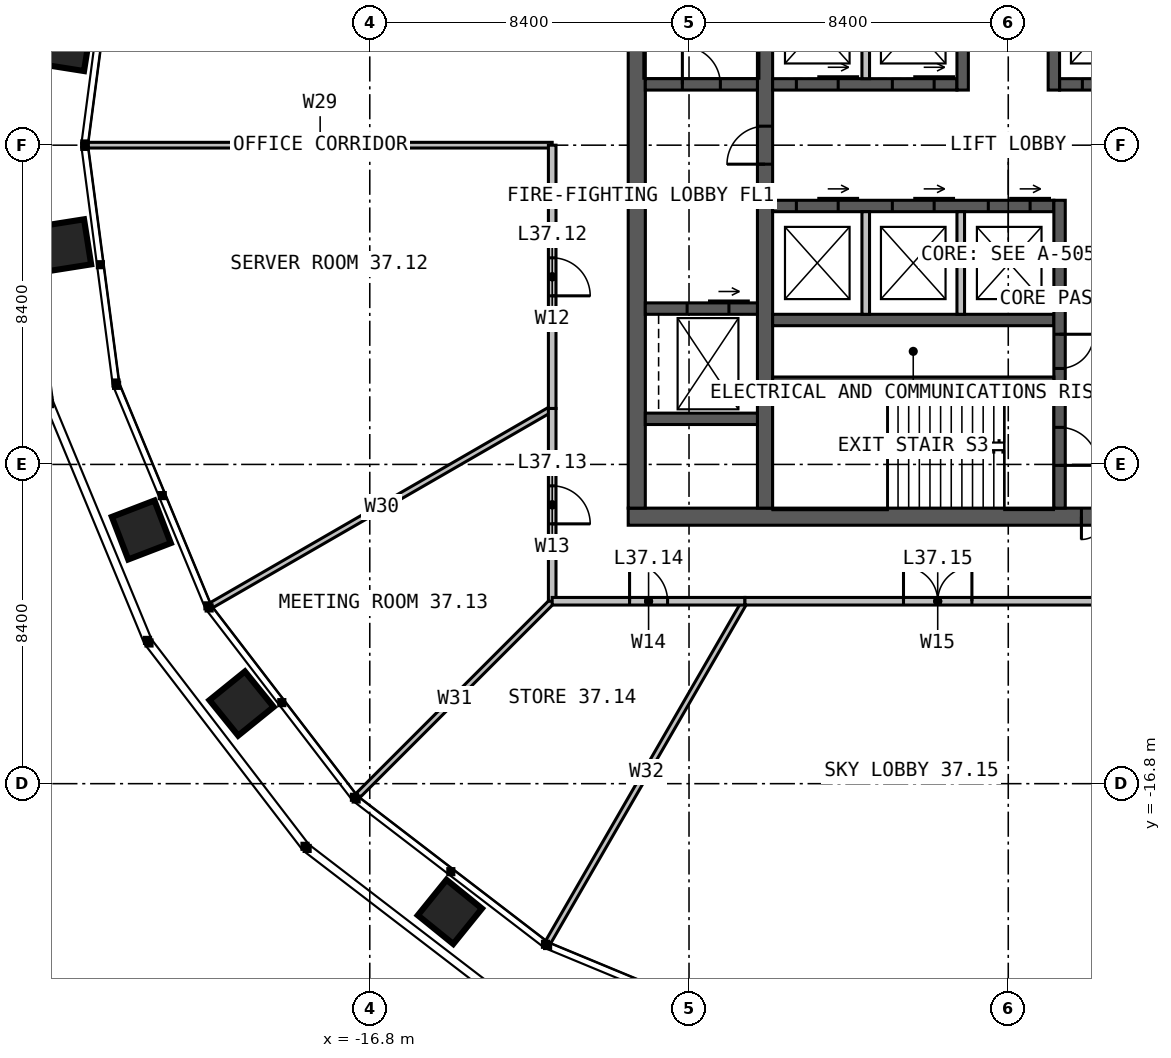
"""IFC4 building model, lengths in metres.
Left out: names, types, materials, properties, quantities, classifications, styles, units other than length and angle.
Written with IfcOpenShell. Run it as: python <this file> out.ifc"""

import sys

from ifc_helpers import new_model, si_unit, direction, frame, frame_2d, origin, place, context, subcontext, project, spatial, rectangle, extrude, element, fill, save


model = new_model("IFC4")
c1 = context("Model", 3, precision=1e-05, world=origin(), true_north=direction((0.0, 1.0)))
c2 = subcontext(c1, "Body", "Model", "MODEL_VIEW")
j1 = project(units=[si_unit("LENGTHUNIT", "METRE"), si_unit("PLANEANGLEUNIT", "RADIAN")], contexts=[c1])
p1 = place(None, origin())
s1 = spatial("IfcSite", under=j1, at=p1, CompositionType="ELEMENT")
p2 = place(p1, origin())
s2 = spatial("IfcBuilding", under=s1, at=p2, CompositionType="ELEMENT")
p3 = place(p2, frame((0.0, 0.0, 155.0)))
s3 = spatial("IfcBuildingStorey", under=s2, at=p3, CompositionType="ELEMENT", Elevation=155.0)
p4 = place(p3, frame((10.0, -9.775, 0.0), z_axis=(0.0, 0.0, 1.0), x_axis=(-1.0, 0.0, 0.0)))
e1 = element("IfcWall", 1, at=p4, inside=s3, PredefinedType="SOLIDWALL", context=c2, shape_type="SweptSolid", body=[
    extrude(rectangle(XDim=20.0, YDim=0.45, at=frame_2d((10.0, 0.0))), origin(), (0.0, 0.0, 1.0), 4.0),
])
p5 = place(p4, frame((6.875, 0.0, 0.0)))
e2 = element("IfcOpeningElement", 2, at=p5, cuts=e1, PredefinedType="OPENING", context=c2, shape_type="SweptSolid", body=[
    extrude(rectangle(XDim=1.2, YDim=2.2, at=frame_2d((0.6, 1.1))), frame((0.0, 0.235, 0.0), z_axis=(0.0, -1.0, 0.0), x_axis=(1.0, 0.0, 0.0)), (0.0, 0.0, 1.0), 0.47),
])
p6 = place(p3, frame((-9.775, 9.55, 0.0), z_axis=(0.0, 0.0, 1.0), x_axis=(0.0, -1.0, 0.0)))
e3 = element("IfcWall", 3, at=p6, inside=s3, PredefinedType="SOLIDWALL", context=c2, shape_type="SweptSolid", body=[
    extrude(rectangle(XDim=19.1, YDim=0.45, at=frame_2d((9.55, 0.0))), origin(), (0.0, 0.0, 1.0), 4.0),
])
p7 = place(p3, frame((-6.4, -9.55, 0.0), z_axis=(0.0, 0.0, 1.0), x_axis=(0.0, 1.0, 0.0)))
e4 = element("IfcWall", 4, at=p7, inside=s3, PredefinedType="SOLIDWALL", context=c2, shape_type="SweptSolid", body=[
    extrude(rectangle(XDim=19.1, YDim=0.4, at=frame_2d((9.55, 0.0))), origin(), (0.0, 0.0, 1.0), 4.0),
])
p8 = place(p7, frame((9.05, 0.0, 0.0)))
e5 = element("IfcOpeningElement", 5, at=p8, cuts=e4, PredefinedType="OPENING", context=c2, shape_type="SweptSolid", body=[
    extrude(rectangle(XDim=1.0, YDim=2.2, at=frame_2d((0.5, 1.1))), frame((0.0, 0.21, 0.0), z_axis=(0.0, -1.0, 0.0), x_axis=(1.0, 0.0, 0.0)), (0.0, 0.0, 1.0), 0.42),
])
p9 = place(p3, frame((-6.2, 1.6, 0.0), z_axis=(0.0, 0.0, 1.0), x_axis=(1.0, 0.0, 0.0)))
e6 = element("IfcWall", 6, at=p9, inside=s3, PredefinedType="SOLIDWALL", context=c2, shape_type="SweptSolid", body=[
    extrude(rectangle(XDim=4.85, YDim=0.3, at=frame_2d((2.425, 0.0))), origin(), (0.0, 0.0, 1.0), 4.0),
])
p10 = place(p9, frame((0.625, 0.0, 0.0)))
e7 = element("IfcOpeningElement", 7, at=p10, cuts=e6, PredefinedType="OPENING", context=c2, shape_type="SweptSolid", body=[
    extrude(rectangle(XDim=1.1, YDim=2.2, at=frame_2d((0.55, 1.1))), frame((0.0, 0.16, 0.0), z_axis=(0.0, -1.0, 0.0), x_axis=(1.0, 0.0, 0.0)), (0.0, 0.0, 1.0), 0.32),
])
p11 = place(p9, frame((3.15, 0.0, 0.0)))
e8 = element("IfcOpeningElement", 8, at=p11, cuts=e6, PredefinedType="OPENING", context=c2, shape_type="SweptSolid", body=[
    extrude(rectangle(XDim=1.1, YDim=2.2, at=frame_2d((0.55, 1.1))), frame((0.0, 0.16, 0.0), z_axis=(0.0, -1.0, 0.0), x_axis=(1.0, 0.0, 0.0)), (0.0, 0.0, 1.0), 0.32),
])
p12 = place(p3, frame((1.35, 1.6, 0.0), z_axis=(0.0, 0.0, 1.0), x_axis=(1.0, 0.0, 0.0)))
e9 = element("IfcWall", 9, at=p12, inside=s3, PredefinedType="SOLIDWALL", context=c2, shape_type="SweptSolid", body=[
    extrude(rectangle(XDim=4.85, YDim=0.3, at=frame_2d((2.425, 0.0))), origin(), (0.0, 0.0, 1.0), 4.0),
])
p13 = place(p12, frame((0.6, 0.0, 0.0)))
e10 = element("IfcOpeningElement", 10, at=p13, cuts=e9, PredefinedType="OPENING", context=c2, shape_type="SweptSolid", body=[
    extrude(rectangle(XDim=1.1, YDim=2.2, at=frame_2d((0.55, 1.1))), frame((0.0, 0.16, 0.0), z_axis=(0.0, -1.0, 0.0), x_axis=(1.0, 0.0, 0.0)), (0.0, 0.0, 1.0), 0.32),
])
p14 = place(p12, frame((3.125, 0.0, 0.0)))
e11 = element("IfcOpeningElement", 11, at=p14, cuts=e9, PredefinedType="OPENING", context=c2, shape_type="SweptSolid", body=[
    extrude(rectangle(XDim=1.1, YDim=2.2, at=frame_2d((0.55, 1.1))), frame((0.0, 0.16, 0.0), z_axis=(0.0, -1.0, 0.0), x_axis=(1.0, 0.0, 0.0)), (0.0, 0.0, 1.0), 0.32),
])
p15 = place(p3, frame((-1.2, 1.45, 0.0), z_axis=(0.0, 0.0, 1.0), x_axis=(0.0, 1.0, 0.0)))
e12 = element("IfcWall", 12, at=p15, inside=s3, PredefinedType="SOLIDWALL", context=c2, shape_type="SweptSolid", body=[
    extrude(rectangle(XDim=8.1, YDim=0.3, at=frame_2d((4.05, 0.0))), origin(), (0.0, 0.0, 1.0), 4.0),
])
p16 = place(p15, frame((5.05, 0.0, 0.0)))
e13 = element("IfcOpeningElement", 13, at=p16, cuts=e12, PredefinedType="OPENING", context=c2, shape_type="SweptSolid", body=[
    extrude(rectangle(XDim=1.0, YDim=2.2, at=frame_2d((0.5, 1.1))), frame((0.0, 0.16, 0.0), z_axis=(0.0, -1.0, 0.0), x_axis=(1.0, 0.0, 0.0)), (0.0, 0.0, 1.0), 0.32),
])
p17 = place(p3, frame((1.2, 1.45, 0.0), z_axis=(0.0, 0.0, 1.0), x_axis=(0.0, 1.0, 0.0)))
e14 = element("IfcWall", 14, at=p17, inside=s3, PredefinedType="SOLIDWALL", context=c2, shape_type="SweptSolid", body=[
    extrude(rectangle(XDim=8.1, YDim=0.3, at=frame_2d((4.05, 0.0))), origin(), (0.0, 0.0, 1.0), 4.0),
])
p18 = place(p17, frame((3.8, 0.0, 0.0)))
e15 = element("IfcOpeningElement", 15, at=p18, cuts=e14, PredefinedType="OPENING", context=c2, shape_type="SweptSolid", body=[
    extrude(rectangle(XDim=1.0, YDim=2.2, at=frame_2d((0.5, 1.1))), frame((0.0, 0.16, 0.0), z_axis=(0.0, -1.0, 0.0), x_axis=(1.0, 0.0, 0.0)), (0.0, 0.0, 1.0), 0.32),
])
p19 = place(p17, frame((6.15, 0.0, 0.0)))
e16 = element("IfcOpeningElement", 16, at=p19, cuts=e14, PredefinedType="OPENING", context=c2, shape_type="SweptSolid", body=[
    extrude(rectangle(XDim=1.0, YDim=2.2, at=frame_2d((0.5, 1.1))), frame((0.0, 0.16, 0.0), z_axis=(0.0, -1.0, 0.0), x_axis=(1.0, 0.0, 0.0)), (0.0, 0.0, 1.0), 0.32),
])
p20 = place(p3, frame((-6.2, -1.6, 0.0), z_axis=(0.0, 0.0, 1.0), x_axis=(1.0, 0.0, 0.0)))
e17 = element("IfcWall", 17, at=p20, inside=s3, PredefinedType="SOLIDWALL", context=c2, shape_type="SweptSolid", body=[
    extrude(rectangle(XDim=7.4, YDim=0.3, at=frame_2d((3.7, 0.0))), origin(), (0.0, 0.0, 1.0), 4.0),
])
p21 = place(p20, frame((0.625, 0.0, 0.0)))
e18 = element("IfcOpeningElement", 18, at=p21, cuts=e17, PredefinedType="OPENING", context=c2, shape_type="SweptSolid", body=[
    extrude(rectangle(XDim=1.1, YDim=2.2, at=frame_2d((0.55, 1.1))), frame((0.0, 0.16, 0.0), z_axis=(0.0, -1.0, 0.0), x_axis=(1.0, 0.0, 0.0)), (0.0, 0.0, 1.0), 0.32),
])
p22 = place(p20, frame((3.15, 0.0, 0.0)))
e19 = element("IfcOpeningElement", 19, at=p22, cuts=e17, PredefinedType="OPENING", context=c2, shape_type="SweptSolid", body=[
    extrude(rectangle(XDim=1.1, YDim=2.2, at=frame_2d((0.55, 1.1))), frame((0.0, 0.16, 0.0), z_axis=(0.0, -1.0, 0.0), x_axis=(1.0, 0.0, 0.0)), (0.0, 0.0, 1.0), 0.32),
])
p23 = place(p20, frame((5.675, 0.0, 0.0)))
e20 = element("IfcOpeningElement", 20, at=p23, cuts=e17, PredefinedType="OPENING", context=c2, shape_type="SweptSolid", body=[
    extrude(rectangle(XDim=1.1, YDim=2.2, at=frame_2d((0.55, 1.1))), frame((0.0, 0.16, 0.0), z_axis=(0.0, -1.0, 0.0), x_axis=(1.0, 0.0, 0.0)), (0.0, 0.0, 1.0), 0.32),
])
p24 = place(p3, frame((-6.2, -4.6, 0.0), z_axis=(0.0, 0.0, 1.0), x_axis=(1.0, 0.0, 0.0)))
e21 = element("IfcWall", 21, at=p24, inside=s3, PredefinedType="SOLIDWALL", context=c2, shape_type="SweptSolid", body=[
    extrude(rectangle(XDim=7.4, YDim=0.3, at=frame_2d((3.7, 0.0))), origin(), (0.0, 0.0, 1.0), 4.0),
])
p25 = place(p3, frame((1.35, -1.45, 0.0), z_axis=(0.0, 0.0, 1.0), x_axis=(0.0, -1.0, 0.0)))
e22 = element("IfcWall", 22, at=p25, inside=s3, PredefinedType="SOLIDWALL", context=c2, shape_type="SweptSolid", body=[
    extrude(rectangle(XDim=8.1, YDim=0.3, at=frame_2d((4.05, 0.0))), origin(), (0.0, 0.0, 1.0), 4.0),
])
p26 = place(p25, frame((5.975, 0.0, 0.0)))
e23 = element("IfcOpeningElement", 23, at=p26, cuts=e22, PredefinedType="OPENING", context=c2, shape_type="SweptSolid", body=[
    extrude(rectangle(XDim=1.0, YDim=2.2, at=frame_2d((0.5, 1.1))), frame((0.0, 0.16, 0.0), z_axis=(0.0, -1.0, 0.0), x_axis=(1.0, 0.0, 0.0)), (0.0, 0.0, 1.0), 0.32),
])
p27 = place(p25, frame((3.525, 0.0, 0.0)))
e24 = element("IfcOpeningElement", 24, at=p27, cuts=e22, PredefinedType="OPENING", context=c2, shape_type="SweptSolid", body=[
    extrude(rectangle(XDim=0.9, YDim=2.2, at=frame_2d((0.45, 1.1))), frame((0.0, 0.16, 0.0), z_axis=(0.0, -1.0, 0.0), x_axis=(1.0, 0.0, 0.0)), (0.0, 0.0, 1.0), 0.32),
])
p28 = place(p3, frame((-6.2, -6.2, 0.0), z_axis=(0.0, 0.0, 1.0), x_axis=(1.0, 0.0, 0.0)))
e25 = element("IfcWall", 25, at=p28, inside=s3, PredefinedType="SOLIDWALL", context=c2, shape_type="SweptSolid", body=[
    extrude(rectangle(XDim=7.4, YDim=0.2, at=frame_2d((3.7, 0.0))), origin(), (0.0, 0.0, 1.0), 4.0),
])
p29 = place(p3, frame((-9.55, 1.6, 0.0), z_axis=(0.0, 0.0, 1.0), x_axis=(1.0, 0.0, 0.0)))
e26 = element("IfcWall", 26, at=p29, inside=s3, PredefinedType="SOLIDWALL", context=c2, shape_type="SweptSolid", body=[
    extrude(rectangle(XDim=2.95, YDim=0.3, at=frame_2d((1.475, 0.0))), origin(), (0.0, 0.0, 1.0), 4.0),
])
p30 = place(p29, frame((0.975, 0.0, 0.0)))
e27 = element("IfcOpeningElement", 27, at=p30, cuts=e26, PredefinedType="OPENING", context=c2, shape_type="SweptSolid", body=[
    extrude(rectangle(XDim=1.0, YDim=2.2, at=frame_2d((0.5, 1.1))), frame((0.0, 0.16, 0.0), z_axis=(0.0, -1.0, 0.0), x_axis=(1.0, 0.0, 0.0)), (0.0, 0.0, 1.0), 0.32),
])
p31 = place(p3, frame((-9.55, -4.3, 0.0), z_axis=(0.0, 0.0, 1.0), x_axis=(1.0, 0.0, 0.0)))
e28 = element("IfcWall", 28, at=p31, inside=s3, PredefinedType="SOLIDWALL", context=c2, shape_type="SweptSolid", body=[
    extrude(rectangle(XDim=2.95, YDim=0.3, at=frame_2d((1.475, 0.0))), origin(), (0.0, 0.0, 1.0), 4.0),
])
p32 = place(p31, frame((1.1, 0.0, 0.0)))
e29 = element("IfcOpeningElement", 29, at=p32, cuts=e28, PredefinedType="OPENING", context=c2, shape_type="SweptSolid", body=[
    extrude(rectangle(XDim=1.1, YDim=2.2, at=frame_2d((0.55, 1.1))), frame((0.0, 0.16, 0.0), z_axis=(0.0, -1.0, 0.0), x_axis=(1.0, 0.0, 0.0)), (0.0, 0.0, 1.0), 0.32),
])
p33 = place(p3, frame((-9.55, -7.2, 0.0), z_axis=(0.0, 0.0, 1.0), x_axis=(1.0, 0.0, 0.0)))
e30 = element("IfcWall", 30, at=p33, inside=s3, PredefinedType="SOLIDWALL", context=c2, shape_type="SweptSolid", body=[
    extrude(rectangle(XDim=2.95, YDim=0.3, at=frame_2d((1.475, 0.0))), origin(), (0.0, 0.0, 1.0), 4.0),
])
for number, where, z_axis, x_axis in (
    (31, (-3.75, 1.75, 0.0), (0.0, 0.0, 1.0), (0.0, 1.0, 0.0)),
    (32, (-3.75, -1.75, 0.0), (0.0, 0.0, 1.0), (0.0, -1.0, 0.0)),
    (33, (-1.25, -1.75, 0.0), (0.0, 0.0, 1.0), (0.0, -1.0, 0.0)),
):
    element("IfcWall", number, at=place(p3, frame(where, z_axis=z_axis, x_axis=x_axis)), inside=s3, PredefinedType="SOLIDWALL", context=c2, shape_type="SweptSolid", body=[
        extrude(rectangle(XDim=2.7, YDim=0.2, at=frame_2d((1.35, 0.0))), origin(), (0.0, 0.0, 1.0), 3.75),
    ])
p34 = place(p3, frame((-12.0, 0.0, 0.0), z_axis=(0.0, 0.0, 1.0), x_axis=(-1.0, 0.0, 0.0)))
e34 = element("IfcWall", 34, at=p34, inside=s3, PredefinedType="PARTITIONING", context=c2, shape_type="SweptSolid", body=[
    extrude(rectangle(XDim=12.211, YDim=0.15, at=frame_2d((6.105, 0.0))), origin(), (0.0, 0.0, 1.0), 2.89),
])
p35 = place(p3, frame((-12.0, -6.928, 0.0), z_axis=(0.0, 0.0, 1.0), x_axis=(-0.86602185845, -0.500006140648, 0.0)))
e35 = element("IfcWall", 35, at=p35, inside=s3, PredefinedType="PARTITIONING", context=c2, shape_type="SweptSolid", body=[
    extrude(rectangle(XDim=10.355, YDim=0.15, at=frame_2d((5.177, 0.0))), origin(), (0.0, 0.0, 1.0), 2.89),
])
p36 = place(p3, frame((-12.0, -12.0, 0.0), z_axis=(0.0, 0.0, 1.0), x_axis=(-0.707106781187, -0.707106781187, 0.0)))
e36 = element("IfcWall", 36, at=p36, inside=s3, PredefinedType="PARTITIONING", context=c2, shape_type="SweptSolid", body=[
    extrude(rectangle(XDim=7.24, YDim=0.15, at=frame_2d((3.62, 0.0))), origin(), (0.0, 0.0, 1.0), 2.89),
])
p37 = place(p3, frame((-6.928, -12.0, 0.0), z_axis=(0.0, 0.0, 1.0), x_axis=(-0.500006140648, -0.86602185845, 0.0)))
e37 = element("IfcWall", 37, at=p37, inside=s3, PredefinedType="PARTITIONING", context=c2, shape_type="SweptSolid", body=[
    extrude(rectangle(XDim=10.355, YDim=0.15, at=frame_2d((5.177, 0.0))), origin(), (0.0, 0.0, 1.0), 2.89),
])
p38 = place(p3, frame((-12.0, 0.0, 0.0), z_axis=(0.0, 0.0, 1.0), x_axis=(0.0, -1.0, 0.0)))
e38 = element("IfcWall", 38, at=p38, inside=s3, PredefinedType="PARTITIONING", context=c2, shape_type="SweptSolid", body=[
    extrude(rectangle(XDim=6.928, YDim=0.2, at=frame_2d((3.464, 0.0))), origin(), (0.0, 0.0, 1.0), 3.8),
])
p39 = place(p38, frame((2.964, 0.0, 0.0)))
e39 = element("IfcOpeningElement", 39, at=p39, cuts=e38, PredefinedType="OPENING", context=c2, shape_type="SweptSolid", body=[
    extrude(rectangle(XDim=1.0, YDim=2.2, at=frame_2d((0.5, 1.1))), frame((0.0, 0.11, 0.0), z_axis=(0.0, -1.0, 0.0), x_axis=(1.0, 0.0, 0.0)), (0.0, 0.0, 1.0), 0.22),
])
p40 = place(p3, frame((-12.0, -6.928, 0.0), z_axis=(0.0, 0.0, 1.0), x_axis=(0.0, -1.0, 0.0)))
e40 = element("IfcWall", 40, at=p40, inside=s3, PredefinedType="PARTITIONING", context=c2, shape_type="SweptSolid", body=[
    extrude(rectangle(XDim=5.072, YDim=0.2, at=frame_2d((2.536, 0.0))), origin(), (0.0, 0.0, 1.0), 3.8),
])
p41 = place(p40, frame((2.036, 0.0, 0.0)))
e41 = element("IfcOpeningElement", 41, at=p41, cuts=e40, PredefinedType="OPENING", context=c2, shape_type="SweptSolid", body=[
    extrude(rectangle(XDim=1.0, YDim=2.2, at=frame_2d((0.5, 1.1))), frame((0.0, 0.11, 0.0), z_axis=(0.0, -1.0, 0.0), x_axis=(1.0, 0.0, 0.0)), (0.0, 0.0, 1.0), 0.22),
])
p42 = place(p3, frame((-12.0, -12.0, 0.0), z_axis=(0.0, 0.0, 1.0), x_axis=(1.0, 0.0, 0.0)))
e42 = element("IfcWall", 42, at=p42, inside=s3, PredefinedType="PARTITIONING", context=c2, shape_type="SweptSolid", body=[
    extrude(rectangle(XDim=5.072, YDim=0.2, at=frame_2d((2.536, 0.0))), origin(), (0.0, 0.0, 1.0), 3.8),
])
p43 = place(p42, frame((2.036, 0.0, 0.0)))
e43 = element("IfcOpeningElement", 43, at=p43, cuts=e42, PredefinedType="OPENING", context=c2, shape_type="SweptSolid", body=[
    extrude(rectangle(XDim=1.0, YDim=2.2, at=frame_2d((0.5, 1.1))), frame((0.0, 0.11, 0.0), z_axis=(0.0, -1.0, 0.0), x_axis=(1.0, 0.0, 0.0)), (0.0, 0.0, 1.0), 0.22),
])
p44 = place(p3, frame((-6.928, -12.0, 0.0), z_axis=(0.0, 0.0, 1.0), x_axis=(1.0, 0.0, 0.0)))
e44 = element("IfcWall", 44, at=p44, inside=s3, PredefinedType="PARTITIONING", context=c2, shape_type="SweptSolid", body=[
    extrude(rectangle(XDim=10.144, YDim=0.2, at=frame_2d((5.072, 0.0))), origin(), (0.0, 0.0, 1.0), 3.8),
])
p45 = place(p44, frame((4.172, 0.0, 0.0)))
e45 = element("IfcOpeningElement", 45, at=p45, cuts=e44, PredefinedType="OPENING", context=c2, shape_type="SweptSolid", body=[
    extrude(rectangle(XDim=1.8, YDim=2.2, at=frame_2d((0.9, 1.1))), frame((0.0, 0.11, 0.0), z_axis=(0.0, -1.0, 0.0), x_axis=(1.0, 0.0, 0.0)), (0.0, 0.0, 1.0), 0.22),
])
p46 = place(p5, origin())
e46 = element("IfcDoor", 46, at=p46, inside=s3, OperationType="DOUBLE_DOOR_SINGLE_SWING", PredefinedType="DOOR", context=c2, shape_type="SweptSolid", body=[
    extrude(rectangle(XDim=1.2, YDim=2.2, at=frame_2d((0.6, 1.1))), frame((0.0, 0.025, 0.0), z_axis=(0.0, -1.0, 0.0), x_axis=(1.0, 0.0, 0.0)), (0.0, 0.0, 1.0), 0.05),
])
fill(e2, e46)
p47 = place(p8, origin())
e47 = element("IfcDoor", 47, at=p47, inside=s3, OperationType="SINGLE_SWING_LEFT", PredefinedType="DOOR", context=c2, shape_type="SweptSolid", body=[
    extrude(rectangle(XDim=1.0, YDim=2.2, at=frame_2d((0.5, 1.1))), frame((0.0, 0.025, 0.0), z_axis=(0.0, -1.0, 0.0), x_axis=(1.0, 0.0, 0.0)), (0.0, 0.0, 1.0), 0.05),
])
fill(e5, e47)
p48 = place(p30, origin())
e48 = element("IfcDoor", 48, at=p48, inside=s3, OperationType="SINGLE_SWING_LEFT", PredefinedType="DOOR", context=c2, shape_type="SweptSolid", body=[
    extrude(rectangle(XDim=1.0, YDim=2.2, at=frame_2d((0.5, 1.1))), frame((0.0, 0.025, 0.0), z_axis=(0.0, -1.0, 0.0), x_axis=(1.0, 0.0, 0.0)), (0.0, 0.0, 1.0), 0.05),
])
fill(e27, e48)
p49 = place(p26, origin())
e49 = element("IfcDoor", 49, at=p49, inside=s3, OperationType="SINGLE_SWING_RIGHT", PredefinedType="DOOR", context=c2, shape_type="SweptSolid", body=[
    extrude(rectangle(XDim=1.0, YDim=2.2, at=frame_2d((0.5, 1.1))), frame((0.0, 0.025, 0.0), z_axis=(0.0, -1.0, 0.0), x_axis=(1.0, 0.0, 0.0)), (0.0, 0.0, 1.0), 0.05),
])
fill(e23, e49)
p50 = place(p27, origin())
e50 = element("IfcDoor", 50, at=p50, inside=s3, OperationType="SINGLE_SWING_LEFT", PredefinedType="DOOR", context=c2, shape_type="SweptSolid", body=[
    extrude(rectangle(XDim=0.9, YDim=2.2, at=frame_2d((0.45, 1.1))), frame((0.0, 0.025, 0.0), z_axis=(0.0, -1.0, 0.0), x_axis=(1.0, 0.0, 0.0)), (0.0, 0.0, 1.0), 0.05),
])
fill(e24, e50)
p51 = place(p10, origin())
e51 = element("IfcDoor", 51, at=p51, inside=s3, OperationType="SLIDING_TO_LEFT", PredefinedType="DOOR", context=c2, shape_type="SweptSolid", body=[
    extrude(rectangle(XDim=1.1, YDim=2.2, at=frame_2d((0.55, 1.1))), frame((0.0, 0.025, 0.0), z_axis=(0.0, -1.0, 0.0), x_axis=(1.0, 0.0, 0.0)), (0.0, 0.0, 1.0), 0.05),
])
fill(e7, e51)
p52 = place(p11, origin())
e52 = element("IfcDoor", 52, at=p52, inside=s3, OperationType="SLIDING_TO_LEFT", PredefinedType="DOOR", context=c2, shape_type="SweptSolid", body=[
    extrude(rectangle(XDim=1.1, YDim=2.2, at=frame_2d((0.55, 1.1))), frame((0.0, 0.025, 0.0), z_axis=(0.0, -1.0, 0.0), x_axis=(1.0, 0.0, 0.0)), (0.0, 0.0, 1.0), 0.05),
])
fill(e8, e52)
p53 = place(p13, origin())
e53 = element("IfcDoor", 53, at=p53, inside=s3, OperationType="SLIDING_TO_LEFT", PredefinedType="DOOR", context=c2, shape_type="SweptSolid", body=[
    extrude(rectangle(XDim=1.1, YDim=2.2, at=frame_2d((0.55, 1.1))), frame((0.0, 0.025, 0.0), z_axis=(0.0, -1.0, 0.0), x_axis=(1.0, 0.0, 0.0)), (0.0, 0.0, 1.0), 0.05),
])
fill(e10, e53)
p54 = place(p21, origin())
e54 = element("IfcDoor", 54, at=p54, inside=s3, OperationType="SLIDING_TO_LEFT", PredefinedType="DOOR", context=c2, shape_type="SweptSolid", body=[
    extrude(rectangle(XDim=1.1, YDim=2.2, at=frame_2d((0.55, 1.1))), frame((0.0, 0.025, 0.0), z_axis=(0.0, -1.0, 0.0), x_axis=(1.0, 0.0, 0.0)), (0.0, 0.0, 1.0), 0.05),
])
fill(e18, e54)
p55 = place(p22, origin())
e55 = element("IfcDoor", 55, at=p55, inside=s3, OperationType="SLIDING_TO_LEFT", PredefinedType="DOOR", context=c2, shape_type="SweptSolid", body=[
    extrude(rectangle(XDim=1.1, YDim=2.2, at=frame_2d((0.55, 1.1))), frame((0.0, 0.025, 0.0), z_axis=(0.0, -1.0, 0.0), x_axis=(1.0, 0.0, 0.0)), (0.0, 0.0, 1.0), 0.05),
])
fill(e19, e55)
p56 = place(p23, origin())
e56 = element("IfcDoor", 56, at=p56, inside=s3, OperationType="SLIDING_TO_LEFT", PredefinedType="DOOR", context=c2, shape_type="SweptSolid", body=[
    extrude(rectangle(XDim=1.1, YDim=2.2, at=frame_2d((0.55, 1.1))), frame((0.0, 0.025, 0.0), z_axis=(0.0, -1.0, 0.0), x_axis=(1.0, 0.0, 0.0)), (0.0, 0.0, 1.0), 0.05),
])
fill(e20, e56)
p57 = place(p32, origin())
e57 = element("IfcDoor", 57, at=p57, inside=s3, OperationType="SLIDING_TO_LEFT", PredefinedType="DOOR", context=c2, shape_type="SweptSolid", body=[
    extrude(rectangle(XDim=1.1, YDim=2.2, at=frame_2d((0.55, 1.1))), frame((0.0, 0.025, 0.0), z_axis=(0.0, -1.0, 0.0), x_axis=(1.0, 0.0, 0.0)), (0.0, 0.0, 1.0), 0.05),
])
fill(e29, e57)
p58 = place(p39, origin())
e58 = element("IfcDoor", 58, at=p58, inside=s3, OperationType="SINGLE_SWING_RIGHT", PredefinedType="DOOR", context=c2, shape_type="SweptSolid", body=[
    extrude(rectangle(XDim=1.0, YDim=2.2, at=frame_2d((0.5, 1.1))), frame((0.0, 0.025, 0.0), z_axis=(0.0, -1.0, 0.0), x_axis=(1.0, 0.0, 0.0)), (0.0, 0.0, 1.0), 0.05),
])
fill(e39, e58)
p59 = place(p41, origin())
e59 = element("IfcDoor", 59, at=p59, inside=s3, OperationType="SINGLE_SWING_RIGHT", PredefinedType="DOOR", context=c2, shape_type="SweptSolid", body=[
    extrude(rectangle(XDim=1.0, YDim=2.2, at=frame_2d((0.5, 1.1))), frame((0.0, 0.025, 0.0), z_axis=(0.0, -1.0, 0.0), x_axis=(1.0, 0.0, 0.0)), (0.0, 0.0, 1.0), 0.05),
])
fill(e41, e59)
p60 = place(p43, origin())
e60 = element("IfcDoor", 60, at=p60, inside=s3, OperationType="SINGLE_SWING_LEFT", PredefinedType="DOOR", context=c2, shape_type="SweptSolid", body=[
    extrude(rectangle(XDim=1.0, YDim=2.2, at=frame_2d((0.5, 1.1))), frame((0.0, 0.025, 0.0), z_axis=(0.0, -1.0, 0.0), x_axis=(1.0, 0.0, 0.0)), (0.0, 0.0, 1.0), 0.05),
])
fill(e43, e60)
p61 = place(p45, origin())
e61 = element("IfcDoor", 61, at=p61, inside=s3, OperationType="DOUBLE_DOOR_SINGLE_SWING", PredefinedType="DOOR", context=c2, shape_type="SweptSolid", body=[
    extrude(rectangle(XDim=1.8, YDim=2.2, at=frame_2d((0.9, 1.1))), frame((0.0, 0.025, 0.0), z_axis=(0.0, -1.0, 0.0), x_axis=(1.0, 0.0, 0.0)), (0.0, 0.0, 1.0), 0.05),
])
fill(e45, e61)
save(model, sys.argv[1])
